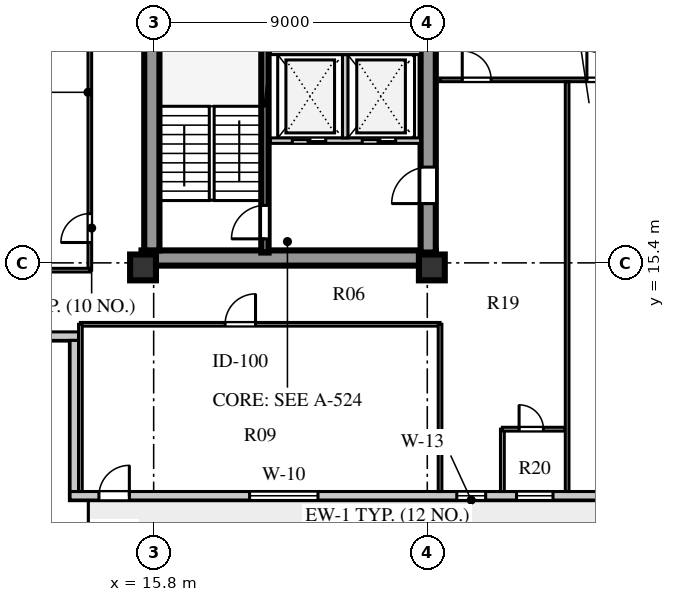
"""IFC4 building model, lengths in metres.
Left out: names, types, materials, properties, quantities, classifications, styles, units other than length and angle.
Written with IfcOpenShell. Run it as: python <this file> out.ifc"""

import sys

from ifc_helpers import new_model, si_unit, direction, frame, frame_2d, origin, origin_2d, place, context, subcontext, project, spatial, rectangle, extrude, element, fill, save


model = new_model("IFC4")
c1 = context("Model", 3, precision=1e-05, world=origin(), true_north=direction((0.0, 1.0)))
c2 = subcontext(c1, "Body", "Model", "MODEL_VIEW")
j1 = project(units=[si_unit("LENGTHUNIT", "METRE"), si_unit("PLANEANGLEUNIT", "RADIAN")], contexts=[c1])
p1 = place(None, origin())
s1 = spatial("IfcSite", under=j1, at=p1, CompositionType="ELEMENT")
p2 = place(p1, origin())
s2 = spatial("IfcBuilding", under=s1, at=p2, CompositionType="ELEMENT")
p3 = place(p2, frame((0.0, 0.0, 181.0)))
s3 = spatial("IfcBuildingStorey", under=s2, at=p3, CompositionType="ELEMENT", Elevation=181.0)
p4 = place(p3, frame((15.4, 15.56, 0.0), z_axis=(0.0, 0.0, 1.0), x_axis=(1.0, 0.0, 0.0)))
e1 = element("IfcWall", 1, at=p4, inside=s3, PredefinedType="SHEAR", context=c2, shape_type="SweptSolid", body=[
    extrude(rectangle(XDim=9.68, YDim=0.5, at=frame_2d((4.84, 0.0))), origin(), (0.0, 0.0, 1.0), 3.6),
])
p5 = place(p3, frame((15.74, 15.81, 0.0), z_axis=(0.0, 0.0, 1.0), x_axis=(0.0, 1.0, 0.0)))
e2 = element("IfcWall", 2, at=p5, inside=s3, PredefinedType="SHEAR", context=c2, shape_type="SweptSolid", body=[
    extrude(rectangle(XDim=25.63, YDim=0.5, at=frame_2d((12.815, 0.0))), origin(), (0.0, 0.0, 1.0), 3.6),
])
p6 = place(p3, frame((24.83, 15.74, 0.0), z_axis=(0.0, 0.0, 1.0), x_axis=(0.0, 1.0, 0.0)))
e3 = element("IfcWall", 3, at=p6, inside=s3, PredefinedType="SHEAR", context=c2, shape_type="SweptSolid", body=[
    extrude(rectangle(XDim=25.76, YDim=0.5, at=frame_2d((12.88, 0.0))), origin(), (0.0, 0.0, 1.0), 3.6),
])
p7 = place(p6, frame((1.61, 0.0, 0.0)))
e4 = element("IfcOpeningElement", 4, at=p7, cuts=e3, PredefinedType="OPENING", context=c2, shape_type="SweptSolid", body=[
    extrude(rectangle(XDim=1.2, YDim=2.1, at=frame_2d((0.6, 1.05))), frame((0.0, 0.26, 0.0), z_axis=(0.0, -1.0, 0.0), x_axis=(1.0, 0.0, 0.0)), (0.0, 0.0, 1.0), 0.52),
])
p8 = place(p6, frame((6.78, 0.0, 0.0)))
e5 = element("IfcOpeningElement", 5, at=p8, cuts=e3, PredefinedType="OPENING", context=c2, shape_type="SweptSolid", body=[
    extrude(rectangle(XDim=0.85, YDim=2.06, at=frame_2d((0.425, 1.03))), frame((0.0, 0.26, 0.0), z_axis=(0.0, -1.0, 0.0), x_axis=(1.0, 0.0, 0.0)), (0.0, 0.0, 1.0), 0.52),
])
p9 = place(p6, frame((12.11, 0.0, 0.0)))
e6 = element("IfcOpeningElement", 6, at=p9, cuts=e3, PredefinedType="OPENING", context=c2, shape_type="SweptSolid", body=[
    extrude(rectangle(XDim=1.5, YDim=2.12, at=frame_2d((0.75, 1.06))), frame((0.0, 0.26, 0.0), z_axis=(0.0, -1.0, 0.0), x_axis=(1.0, 0.0, 0.0)), (0.0, 0.0, 1.0), 0.52),
])
p10 = place(p6, frame((20.11, 0.0, 0.0)))
e7 = element("IfcOpeningElement", 7, at=p10, cuts=e3, PredefinedType="OPENING", context=c2, shape_type="SweptSolid", body=[
    extrude(rectangle(XDim=1.2, YDim=2.12, at=frame_2d((0.6, 1.06))), frame((0.0, 0.26, 0.0), z_axis=(0.0, -1.0, 0.0), x_axis=(1.0, 0.0, 0.0)), (0.0, 0.0, 1.0), 0.52),
])
p11 = place(p6, frame((24.01, 0.0, 0.0)))
e8 = element("IfcOpeningElement", 8, at=p11, cuts=e3, PredefinedType="OPENING", context=c2, shape_type="SweptSolid", body=[
    extrude(rectangle(XDim=0.95, YDim=2.1, at=frame_2d((0.475, 1.05))), frame((0.0, 0.26, 0.0), z_axis=(0.0, -1.0, 0.0), x_axis=(1.0, 0.0, 0.0)), (0.0, 0.0, 1.0), 0.52),
])
for number, where, z_axis, x_axis in (
    (9, (15.45, 15.25, 0.0), (0.0, 0.0, 1.0), (1.0, 0.0, 0.0)),
    (10, (24.95, 15.25, 0.0), (0.0, 0.0, 1.0), (1.0, 0.0, 0.0)),
):
    element("IfcColumn", number, at=place(p3, frame(where, z_axis=z_axis, x_axis=x_axis)), inside=s3, PredefinedType="COLUMN", context=c2, shape_type="SweptSolid", body=[
        extrude(rectangle(XDim=0.85, YDim=0.85, at=origin_2d()), origin(), (0.0, 0.0, 1.0), 3.6),
    ])
p12 = place(p3, frame((13.05, 7.74, 0.0), z_axis=(0.0, 0.0, 1.0), x_axis=(1.0, 0.0, 0.0)))
e11 = element("IfcWall", 11, at=p12, inside=s3, PredefinedType="STANDARD", context=c2, shape_type="SweptSolid", body=[
    extrude(rectangle(XDim=32.5, YDim=0.28, at=frame_2d((16.25, 0.0))), origin(), (0.0, 0.0, 1.0), 3.6),
])
p13 = place(p12, frame((0.95, 0.0, 0.0)))
e12 = element("IfcOpeningElement", 12, at=p13, cuts=e11, PredefinedType="OPENING", context=c2, shape_type="SweptSolid", body=[
    extrude(rectangle(XDim=1.0, YDim=2.05, at=frame_2d((0.5, 1.025))), frame((0.0, 0.15, 0.0), z_axis=(0.0, -1.0, 0.0), x_axis=(1.0, 0.0, 0.0)), (0.0, 0.0, 1.0), 0.3),
])
p14 = place(p12, frame((5.905, 0.0, 0.8)))
e13 = element("IfcOpeningElement", 13, at=p14, cuts=e11, PredefinedType="OPENING", context=c2, shape_type="SweptSolid", body=[
    extrude(rectangle(XDim=2.25, YDim=2.0, at=frame_2d((1.125, 1.0))), frame((0.0, 0.15, 0.0), z_axis=(0.0, -1.0, 0.0), x_axis=(1.0, 0.0, 0.0)), (0.0, 0.0, 1.0), 0.3),
])
p15 = place(p12, frame((12.72, 0.0, 0.8)))
e14 = element("IfcOpeningElement", 14, at=p15, cuts=e11, PredefinedType="OPENING", context=c2, shape_type="SweptSolid", body=[
    extrude(rectangle(XDim=0.95, YDim=1.65, at=frame_2d((0.475, 0.825))), frame((0.0, 0.15, 0.0), z_axis=(0.0, -1.0, 0.0), x_axis=(1.0, 0.0, 0.0)), (0.0, 0.0, 1.0), 0.3),
])
p16 = place(p12, frame((14.685, 0.0, 0.8)))
e15 = element("IfcOpeningElement", 15, at=p16, cuts=e11, PredefinedType="OPENING", context=c2, shape_type="SweptSolid", body=[
    extrude(rectangle(XDim=1.2, YDim=1.75, at=frame_2d((0.6, 0.875))), frame((0.0, 0.15, 0.0), z_axis=(0.0, -1.0, 0.0), x_axis=(1.0, 0.0, 0.0)), (0.0, 0.0, 1.0), 0.3),
])
p17 = place(p12, frame((17.385, 0.0, 0.8)))
e16 = element("IfcOpeningElement", 16, at=p17, cuts=e11, PredefinedType="OPENING", context=c2, shape_type="SweptSolid", body=[
    extrude(rectangle(XDim=1.2, YDim=1.75, at=frame_2d((0.6, 0.875))), frame((0.0, 0.15, 0.0), z_axis=(0.0, -1.0, 0.0), x_axis=(1.0, 0.0, 0.0)), (0.0, 0.0, 1.0), 0.3),
])
p18 = place(p12, frame((20.085, 0.0, 0.8)))
e17 = element("IfcOpeningElement", 17, at=p18, cuts=e11, PredefinedType="OPENING", context=c2, shape_type="SweptSolid", body=[
    extrude(rectangle(XDim=1.2, YDim=1.75, at=frame_2d((0.6, 0.875))), frame((0.0, 0.15, 0.0), z_axis=(0.0, -1.0, 0.0), x_axis=(1.0, 0.0, 0.0)), (0.0, 0.0, 1.0), 0.3),
])
p19 = place(p12, frame((22.605, 0.0, 0.8)))
e18 = element("IfcOpeningElement", 18, at=p19, cuts=e11, PredefinedType="OPENING", context=c2, shape_type="SweptSolid", body=[
    extrude(rectangle(XDim=2.1, YDim=1.95, at=frame_2d((1.05, 0.975))), frame((0.0, 0.15, 0.0), z_axis=(0.0, -1.0, 0.0), x_axis=(1.0, 0.0, 0.0)), (0.0, 0.0, 1.0), 0.3),
])
p20 = place(p12, frame((26.065, 0.0, 0.8)))
e19 = element("IfcOpeningElement", 19, at=p20, cuts=e11, PredefinedType="OPENING", context=c2, shape_type="SweptSolid", body=[
    extrude(rectangle(XDim=1.2, YDim=1.75, at=frame_2d((0.6, 0.875))), frame((0.0, 0.15, 0.0), z_axis=(0.0, -1.0, 0.0), x_axis=(1.0, 0.0, 0.0)), (0.0, 0.0, 1.0), 0.3),
])
p21 = place(p12, frame((29.255, 0.0, 0.8)))
e20 = element("IfcOpeningElement", 20, at=p21, cuts=e11, PredefinedType="OPENING", context=c2, shape_type="SweptSolid", body=[
    extrude(rectangle(XDim=1.65, YDim=1.95, at=frame_2d((0.825, 0.975))), frame((0.0, 0.15, 0.0), z_axis=(0.0, -1.0, 0.0), x_axis=(1.0, 0.0, 0.0)), (0.0, 0.0, 1.0), 0.3),
])
p22 = place(p3, frame((7.8, 12.99, 0.0), z_axis=(0.0, 0.0, 1.0), x_axis=(1.0, 0.0, 0.0)))
e21 = element("IfcWall", 21, at=p22, inside=s3, PredefinedType="STANDARD", context=c2, shape_type="SweptSolid", body=[
    extrude(rectangle(XDim=5.53, YDim=0.28, at=frame_2d((2.765, 0.0))), origin(), (0.0, 0.0, 1.0), 3.6),
])
p23 = place(p3, frame((13.19, 12.85, 0.0), z_axis=(0.0, 0.0, 1.0), x_axis=(0.0, -1.0, 0.0)))
e22 = element("IfcWall", 22, at=p23, inside=s3, PredefinedType="STANDARD", context=c2, shape_type="SweptSolid", body=[
    extrude(rectangle(XDim=4.97, YDim=0.28, at=frame_2d((2.485, 0.0))), origin(), (0.0, 0.0, 1.0), 3.6),
])
p24 = place(p3, frame((19.46, 15.74, 0.0), z_axis=(0.0, 0.0, 1.0), x_axis=(0.0, 1.0, 0.0)))
e23 = element("IfcWall", 23, at=p24, inside=s3, PredefinedType="SHEAR", context=c2, shape_type="SweptSolid", body=[
    extrude(rectangle(XDim=8.2, YDim=0.24, at=frame_2d((4.1, 0.0))), origin(), (0.0, 0.0, 1.0), 3.85),
])
p25 = place(p24, frame((0.45, 0.0, 0.0)))
e24 = element("IfcOpeningElement", 24, at=p25, cuts=e23, PredefinedType="OPENING", context=c2, shape_type="SweptSolid", body=[
    extrude(rectangle(XDim=1.1, YDim=2.1, at=frame_2d((0.55, 1.05))), frame((0.0, 0.13, 0.0), z_axis=(0.0, -1.0, 0.0), x_axis=(1.0, 0.0, 0.0)), (0.0, 0.0, 1.0), 0.26),
])
p26 = place(p3, frame((19.64, 19.42, 0.0), z_axis=(0.0, 0.0, 1.0), x_axis=(1.0, 0.0, 0.0)))
e25 = element("IfcWall", 25, at=p26, inside=s3, PredefinedType="SOLIDWALL", context=c2, shape_type="SweptSolid", body=[
    extrude(rectangle(XDim=4.94, YDim=0.18, at=frame_2d((2.47, 0.0))), origin(), (0.0, 0.0, 1.0), 3.6),
])
p27 = place(p26, frame((0.72, 0.0, 0.0)))
e26 = element("IfcOpeningElement", 26, at=p27, cuts=e25, PredefinedType="OPENING", context=c2, shape_type="SweptSolid", body=[
    extrude(rectangle(XDim=1.1, YDim=2.1, at=frame_2d((0.55, 1.05))), frame((0.0, 0.1, 0.0), z_axis=(0.0, -1.0, 0.0), x_axis=(1.0, 0.0, 0.0)), (0.0, 0.0, 1.0), 0.2),
])
p28 = place(p26, frame((3.02, 0.0, 0.0)))
e27 = element("IfcOpeningElement", 27, at=p28, cuts=e25, PredefinedType="OPENING", context=c2, shape_type="SweptSolid", body=[
    extrude(rectangle(XDim=1.1, YDim=2.1, at=frame_2d((0.55, 1.05))), frame((0.0, 0.1, 0.0), z_axis=(0.0, -1.0, 0.0), x_axis=(1.0, 0.0, 0.0)), (0.0, 0.0, 1.0), 0.2),
])
p29 = place(p3, frame((22.1, 19.51, 0.0), z_axis=(0.0, 0.0, 1.0), x_axis=(0.0, 1.0, 0.0)))
e28 = element("IfcWall", 28, at=p29, inside=s3, PredefinedType="SOLIDWALL", context=c2, shape_type="SweptSolid", body=[
    extrude(rectangle(XDim=2.74, YDim=0.18, at=frame_2d((1.37, 0.0))), origin(), (0.0, 0.0, 1.0), 3.6),
])
p30 = place(p3, frame((19.64, 22.34, 0.0), z_axis=(0.0, 0.0, 1.0), x_axis=(1.0, 0.0, 0.0)))
e29 = element("IfcWall", 29, at=p30, inside=s3, PredefinedType="SOLIDWALL", context=c2, shape_type="SweptSolid", body=[
    extrude(rectangle(XDim=4.94, YDim=0.18, at=frame_2d((2.47, 0.0))), origin(), (0.0, 0.0, 1.0), 3.6),
])
p31 = place(p3, frame((25.22, 21.42, 0.0), z_axis=(0.0, 0.0, 1.0), x_axis=(1.0, 0.0, 0.0)))
e30 = element("IfcWall", 30, at=p31, inside=s3, PredefinedType="PARTITIONING", context=c2, shape_type="SweptSolid", body=[
    extrude(rectangle(XDim=15.6, YDim=0.12, at=frame_2d((7.8, 0.0))), origin(), (0.0, 0.0, 1.0), 3.25),
])
p32 = place(p31, frame((0.73, 0.0, 0.0)))
e31 = element("IfcOpeningElement", 31, at=p32, cuts=e30, PredefinedType="OPENING", context=c2, shape_type="SweptSolid", body=[
    extrude(rectangle(XDim=0.95, YDim=2.1, at=frame_2d((0.475, 1.05))), frame((0.0, 0.07, 0.0), z_axis=(0.0, -1.0, 0.0), x_axis=(1.0, 0.0, 0.0)), (0.0, 0.0, 1.0), 0.14),
])
p33 = place(p31, frame((4.83, 0.0, 0.0)))
e32 = element("IfcOpeningElement", 32, at=p33, cuts=e30, PredefinedType="OPENING", context=c2, shape_type="SweptSolid", body=[
    extrude(rectangle(XDim=0.95, YDim=2.1, at=frame_2d((0.475, 1.05))), frame((0.0, 0.07, 0.0), z_axis=(0.0, -1.0, 0.0), x_axis=(1.0, 0.0, 0.0)), (0.0, 0.0, 1.0), 0.14),
])
p34 = place(p31, frame((10.23, 0.0, 0.0)))
e33 = element("IfcOpeningElement", 33, at=p34, cuts=e30, PredefinedType="OPENING", context=c2, shape_type="SweptSolid", body=[
    extrude(rectangle(XDim=0.95, YDim=2.1, at=frame_2d((0.475, 1.05))), frame((0.0, 0.07, 0.0), z_axis=(0.0, -1.0, 0.0), x_axis=(1.0, 0.0, 0.0)), (0.0, 0.0, 1.0), 0.14),
])
p35 = place(p3, frame((13.7, 15.16, 0.0), z_axis=(0.0, 0.0, 1.0), x_axis=(0.0, 1.0, 0.0)))
e34 = element("IfcWall", 34, at=p35, inside=s3, PredefinedType="PARTITIONING", context=c2, shape_type="SweptSolid", body=[
    extrude(rectangle(XDim=26.88, YDim=0.12, at=frame_2d((13.44, 0.0))), origin(), (0.0, 0.0, 1.0), 3.6),
])
p36 = place(p35, frame((0.91, 0.0, 0.0)))
e35 = element("IfcOpeningElement", 35, at=p36, cuts=e34, PredefinedType="OPENING", context=c2, shape_type="SweptSolid", body=[
    extrude(rectangle(XDim=0.95, YDim=2.1, at=frame_2d((0.475, 1.05))), frame((0.0, 0.07, 0.0), z_axis=(0.0, -1.0, 0.0), x_axis=(1.0, 0.0, 0.0)), (0.0, 0.0, 1.0), 0.14),
])
p37 = place(p35, frame((9.84, 0.0, 0.0)))
e36 = element("IfcOpeningElement", 36, at=p37, cuts=e34, PredefinedType="OPENING", context=c2, shape_type="SweptSolid", body=[
    extrude(rectangle(XDim=0.95, YDim=2.1, at=frame_2d((0.475, 1.05))), frame((0.0, 0.07, 0.0), z_axis=(0.0, -1.0, 0.0), x_axis=(1.0, 0.0, 0.0)), (0.0, 0.0, 1.0), 0.14),
])
p38 = place(p35, frame((18.69, 0.0, 0.0)))
e37 = element("IfcOpeningElement", 37, at=p38, cuts=e34, PredefinedType="OPENING", context=c2, shape_type="SweptSolid", body=[
    extrude(rectangle(XDim=0.95, YDim=2.1, at=frame_2d((0.475, 1.05))), frame((0.0, 0.07, 0.0), z_axis=(0.0, -1.0, 0.0), x_axis=(1.0, 0.0, 0.0)), (0.0, 0.0, 1.0), 0.14),
])
p39 = place(p3, frame((8.08, 15.16, 0.0), z_axis=(0.0, 0.0, 1.0), x_axis=(1.0, 0.0, 0.0)))
e38 = element("IfcWall", 38, at=p39, inside=s3, PredefinedType="PARTITIONING", context=c2, shape_type="SweptSolid", body=[
    extrude(rectangle(XDim=5.62, YDim=0.12, at=frame_2d((2.81, 0.0))), origin(), (0.0, 0.0, 1.0), 3.15),
])
p40 = place(p3, frame((13.39, 13.38, 0.0), z_axis=(0.0, 0.0, 1.0), x_axis=(1.0, 0.0, 0.0)))
e39 = element("IfcWall", 39, at=p40, inside=s3, PredefinedType="PARTITIONING", context=c2, shape_type="SweptSolid", body=[
    extrude(rectangle(XDim=11.83, YDim=0.12, at=frame_2d((5.915, 0.0))), origin(), (0.0, 0.0, 1.0), 3.6),
])
p41 = place(p40, frame((4.76, 0.0, 0.0)))
e40 = element("IfcOpeningElement", 40, at=p41, cuts=e39, PredefinedType="OPENING", context=c2, shape_type="SweptSolid", body=[
    extrude(rectangle(XDim=1.0, YDim=2.08, at=frame_2d((0.5, 1.04))), frame((0.0, 0.07, 0.0), z_axis=(0.0, -1.0, 0.0), x_axis=(1.0, 0.0, 0.0)), (0.0, 0.0, 1.0), 0.14),
])
p42 = place(p3, frame((13.39, 7.88, 0.0), z_axis=(0.0, 0.0, 1.0), x_axis=(0.0, 1.0, 0.0)))
e41 = element("IfcWall", 41, at=p42, inside=s3, PredefinedType="PARTITIONING", context=c2, shape_type="SweptSolid", body=[
    extrude(rectangle(XDim=5.5, YDim=0.12, at=frame_2d((2.75, 0.0))), origin(), (0.0, 0.0, 1.0), 3.6),
])
p43 = place(p3, frame((25.22, 7.88, 0.0), z_axis=(0.0, 0.0, 1.0), x_axis=(0.0, 1.0, 0.0)))
e42 = element("IfcWall", 42, at=p43, inside=s3, PredefinedType="PARTITIONING", context=c2, shape_type="SweptSolid", body=[
    extrude(rectangle(XDim=5.5, YDim=0.12, at=frame_2d((2.75, 0.0))), origin(), (0.0, 0.0, 1.0), 3.15),
])
p44 = place(p3, frame((27.27, 7.88, 0.0), z_axis=(0.0, 0.0, 1.0), x_axis=(0.0, 1.0, 0.0)))
e43 = element("IfcWall", 43, at=p44, inside=s3, PredefinedType="PLUMBINGWALL", context=c2, shape_type="SweptSolid", body=[
    extrude(rectangle(XDim=2.05, YDim=0.125, at=frame_2d((1.025, 0.0))), origin(), (0.0, 0.0, 1.0), 3.6),
])
p45 = place(p3, frame((27.27, 9.93, 0.0), z_axis=(0.0, 0.0, 1.0), x_axis=(1.0, 0.0, 0.0)))
e44 = element("IfcWall", 44, at=p45, inside=s3, PredefinedType="PLUMBINGWALL", context=c2, shape_type="SweptSolid", body=[
    extrude(rectangle(XDim=2.05, YDim=0.125, at=frame_2d((1.025, 0.0))), origin(), (0.0, 0.0, 1.0), 3.6),
])
p46 = place(p45, frame((0.55, 0.0, 0.0)))
e45 = element("IfcOpeningElement", 45, at=p46, cuts=e44, PredefinedType="OPENING", context=c2, shape_type="SweptSolid", body=[
    extrude(rectangle(XDim=0.8, YDim=2.05, at=frame_2d((0.4, 1.025))), frame((0.0, 0.073, 0.0), z_axis=(0.0, -1.0, 0.0), x_axis=(1.0, 0.0, 0.0)), (0.0, 0.0, 1.0), 0.145),
])
p47 = place(p3, frame((29.4, 7.88, 0.0), z_axis=(0.0, 0.0, 1.0), x_axis=(0.0, 1.0, 0.0)))
e46 = element("IfcWall", 46, at=p47, inside=s3, PredefinedType="PARTITIONING", context=c2, shape_type="SweptSolid", body=[
    extrude(rectangle(XDim=13.48, YDim=0.12, at=frame_2d((6.74, 0.0))), origin(), (0.0, 0.0, 1.0), 3.6),
])
p48 = place(p13, frame((1.0, 0.0, 0.0), z_axis=(0.0, 0.0, 1.0), x_axis=(-1.0, 0.0, 0.0)))
e47 = element("IfcDoor", 47, at=p48, inside=s3, OperationType="SINGLE_SWING_LEFT", PredefinedType="DOOR", context=c2, shape_type="SweptSolid", body=[
    extrude(rectangle(XDim=1.0, YDim=2.05, at=frame_2d((0.5, 1.025))), frame((0.0, 0.025, 0.0), z_axis=(0.0, -1.0, 0.0), x_axis=(1.0, 0.0, 0.0)), (0.0, 0.0, 1.0), 0.05),
])
fill(e12, e47)
p49 = place(p14, origin())
e48 = element("IfcWindow", 48, at=p49, inside=s3, PartitioningType="SINGLE_PANEL", PredefinedType="WINDOW", context=c2, shape_type="SweptSolid", body=[
    extrude(rectangle(XDim=2.25, YDim=2.0, at=frame_2d((1.125, 1.0))), frame((0.0, 0.03, 0.0), z_axis=(0.0, -1.0, 0.0), x_axis=(1.0, 0.0, 0.0)), (0.0, 0.0, 1.0), 0.06),
])
fill(e13, e48)
p50 = place(p15, origin())
e49 = element("IfcWindow", 49, at=p50, inside=s3, PartitioningType="SINGLE_PANEL", PredefinedType="WINDOW", context=c2, shape_type="SweptSolid", body=[
    extrude(rectangle(XDim=0.95, YDim=1.65, at=frame_2d((0.475, 0.825))), frame((0.0, 0.03, 0.0), z_axis=(0.0, -1.0, 0.0), x_axis=(1.0, 0.0, 0.0)), (0.0, 0.0, 1.0), 0.06),
])
fill(e14, e49)
p51 = place(p16, origin())
e50 = element("IfcWindow", 50, at=p51, inside=s3, PartitioningType="SINGLE_PANEL", PredefinedType="WINDOW", context=c2, shape_type="SweptSolid", body=[
    extrude(rectangle(XDim=1.2, YDim=1.75, at=frame_2d((0.6, 0.875))), frame((0.0, 0.03, 0.0), z_axis=(0.0, -1.0, 0.0), x_axis=(1.0, 0.0, 0.0)), (0.0, 0.0, 1.0), 0.06),
])
fill(e15, e50)
p52 = place(p25, origin())
e51 = element("IfcDoor", 51, at=p52, inside=s3, OperationType="SINGLE_SWING_LEFT", PredefinedType="DOOR", context=c2, shape_type="SweptSolid", body=[
    extrude(rectangle(XDim=1.1, YDim=2.1, at=frame_2d((0.55, 1.05))), frame((0.0, 0.025, 0.0), z_axis=(0.0, -1.0, 0.0), x_axis=(1.0, 0.0, 0.0)), (0.0, 0.0, 1.0), 0.05),
])
fill(e24, e51)
p53 = place(p27, origin())
e52 = element("IfcDoor", 52, at=p53, inside=s3, OperationType="DOUBLE_DOOR_SLIDING", PredefinedType="DOOR", context=c2, shape_type="SweptSolid", body=[
    extrude(rectangle(XDim=1.1, YDim=2.1, at=frame_2d((0.55, 1.05))), frame((0.0, 0.025, 0.0), z_axis=(0.0, -1.0, 0.0), x_axis=(1.0, 0.0, 0.0)), (0.0, 0.0, 1.0), 0.05),
])
fill(e26, e52)
p54 = place(p28, origin())
e53 = element("IfcDoor", 53, at=p54, inside=s3, OperationType="DOUBLE_DOOR_SLIDING", PredefinedType="DOOR", context=c2, shape_type="SweptSolid", body=[
    extrude(rectangle(XDim=1.1, YDim=2.1, at=frame_2d((0.55, 1.05))), frame((0.0, 0.025, 0.0), z_axis=(0.0, -1.0, 0.0), x_axis=(1.0, 0.0, 0.0)), (0.0, 0.0, 1.0), 0.05),
])
fill(e27, e53)
p55 = place(p7, frame((1.2, 0.0, 0.0), z_axis=(0.0, 0.0, 1.0), x_axis=(-1.0, 0.0, 0.0)))
e54 = element("IfcDoor", 54, at=p55, inside=s3, OperationType="SINGLE_SWING_RIGHT", PredefinedType="DOOR", context=c2, shape_type="SweptSolid", body=[
    extrude(rectangle(XDim=1.2, YDim=2.1, at=frame_2d((0.6, 1.05))), frame((0.0, 0.025, 0.0), z_axis=(0.0, -1.0, 0.0), x_axis=(1.0, 0.0, 0.0)), (0.0, 0.0, 1.0), 0.05),
])
fill(e4, e54)
p56 = place(p41, frame((1.0, 0.0, 0.0), z_axis=(0.0, 0.0, 1.0), x_axis=(-1.0, 0.0, 0.0)))
e55 = element("IfcDoor", 55, at=p56, inside=s3, OperationType="SINGLE_SWING_LEFT", PredefinedType="DOOR", context=c2, shape_type="SweptSolid", body=[
    extrude(rectangle(XDim=1.0, YDim=2.08, at=frame_2d((0.5, 1.04))), frame((0.0, 0.025, 0.0), z_axis=(0.0, -1.0, 0.0), x_axis=(1.0, 0.0, 0.0)), (0.0, 0.0, 1.0), 0.05),
])
fill(e40, e55)
p57 = place(p36, origin())
e56 = element("IfcDoor", 56, at=p57, inside=s3, OperationType="SINGLE_SWING_LEFT", PredefinedType="DOOR", context=c2, shape_type="SweptSolid", body=[
    extrude(rectangle(XDim=0.95, YDim=2.1, at=frame_2d((0.475, 1.05))), frame((0.0, 0.025, 0.0), z_axis=(0.0, -1.0, 0.0), x_axis=(1.0, 0.0, 0.0)), (0.0, 0.0, 1.0), 0.05),
])
fill(e35, e56)
p58 = place(p32, frame((0.95, 0.0, 0.0), z_axis=(0.0, 0.0, 1.0), x_axis=(-1.0, 0.0, 0.0)))
e57 = element("IfcDoor", 57, at=p58, inside=s3, OperationType="SINGLE_SWING_RIGHT", PredefinedType="DOOR", context=c2, shape_type="SweptSolid", body=[
    extrude(rectangle(XDim=0.95, YDim=2.1, at=frame_2d((0.475, 1.05))), frame((0.0, 0.025, 0.0), z_axis=(0.0, -1.0, 0.0), x_axis=(1.0, 0.0, 0.0)), (0.0, 0.0, 1.0), 0.05),
])
fill(e31, e57)
p59 = place(p46, origin())
e58 = element("IfcDoor", 58, at=p59, inside=s3, OperationType="SINGLE_SWING_LEFT", PredefinedType="DOOR", context=c2, shape_type="SweptSolid", body=[
    extrude(rectangle(XDim=0.8, YDim=2.05, at=frame_2d((0.4, 1.025))), frame((0.0, 0.025, 0.0), z_axis=(0.0, -1.0, 0.0), x_axis=(1.0, 0.0, 0.0)), (0.0, 0.0, 1.0), 0.05),
])
fill(e45, e58)
p60 = place(p33, frame((0.95, 0.0, 0.0), z_axis=(0.0, 0.0, 1.0), x_axis=(-1.0, 0.0, 0.0)))
e59 = element("IfcDoor", 59, at=p60, inside=s3, OperationType="SINGLE_SWING_RIGHT", PredefinedType="DOOR", context=c2, shape_type="SweptSolid", body=[
    extrude(rectangle(XDim=0.95, YDim=2.1, at=frame_2d((0.475, 1.05))), frame((0.0, 0.025, 0.0), z_axis=(0.0, -1.0, 0.0), x_axis=(1.0, 0.0, 0.0)), (0.0, 0.0, 1.0), 0.05),
])
fill(e32, e59)
save(model, sys.argv[1])
